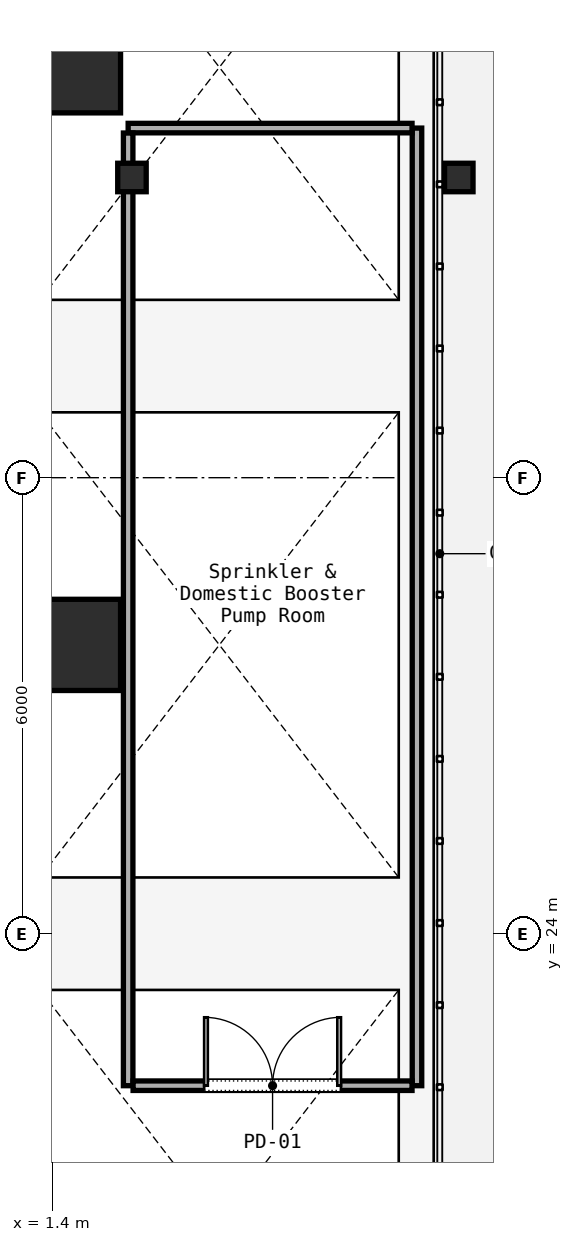
"""IFC4 building model, lengths in metres.
Left out: names, types, materials, properties, quantities, classifications, styles, units other than length and angle.
Written with IfcOpenShell. Run it as: python <this file> out.ifc"""

import sys

from ifc_helpers import new_model, si_unit, direction, frame, frame_2d, origin, origin_2d, place, context, subcontext, project, spatial, rectangle, i_section, extrude, element, fill, save


model = new_model("IFC4")
c1 = context("Model", 3, precision=1e-05, world=origin(), true_north=direction((0.0, 1.0)))
c2 = subcontext(c1, "Body", "Model", "MODEL_VIEW")
j1 = project(units=[si_unit("LENGTHUNIT", "METRE"), si_unit("PLANEANGLEUNIT", "RADIAN")], contexts=[c1])
p1 = place(None, origin())
s1 = spatial("IfcSite", under=j1, at=p1, CompositionType="ELEMENT")
p2 = place(p1, origin())
s2 = spatial("IfcBuilding", under=s1, at=p2, CompositionType="ELEMENT")
p3 = place(p2, frame((0.0, 0.0, -9.0)))
s3 = spatial("IfcBuildingStorey", under=s2, at=p3, CompositionType="ELEMENT", Elevation=-9.0)
for number, where, z_axis, x_axis in (
    (1, (1.7, 27.8, 0.0), (0.0, 0.0, 1.0), (1.0, 0.0, 0.0)),
    (2, (1.7, 35.4, 0.0), (0.0, 0.0, 1.0), (1.0, 0.0, 0.0)),
):
    element("IfcColumn", number, at=place(p3, frame(where, z_axis=z_axis, x_axis=x_axis)), inside=s3, PredefinedType="COLUMN", context=c2, shape_type="SweptSolid", body=[
        extrude(rectangle(XDim=1.2, YDim=1.2, at=origin_2d()), origin(), (0.0, 0.0, 1.0), 4.15),
    ])
for number, where, z_axis, x_axis in (
    (3, (2.45, 33.95, 0.0), (0.0, 0.0, 1.0), (1.0, 0.0, 0.0)),
    (4, (6.75, 33.95, 0.0), (0.0, 0.0, 1.0), (1.0, 0.0, 0.0)),
):
    element("IfcColumn", number, at=place(p3, frame(where, z_axis=z_axis, x_axis=x_axis)), inside=s3, PredefinedType="COLUMN", context=c2, shape_type="SweptSolid", body=[
        extrude(i_section(OverallWidth=0.375, OverallDepth=0.375, WebThickness=0.017, FlangeThickness=0.027, FilletRadius=0.015, at=origin_2d()), origin(), (0.0, 0.0, 1.0), 4.5),
    ])
p4 = place(p3, frame((6.2, 22.0, 0.0), z_axis=(0.0, 0.0, 1.0), x_axis=(0.0, 1.0, 0.0)))
e5 = element("IfcWall", 5, at=p4, inside=s3, PredefinedType="PARTITIONING", context=c2, shape_type="SweptSolid", body=[
    extrude(rectangle(XDim=12.6, YDim=0.125, at=frame_2d((6.3, 0.0))), origin(), (0.0, 0.0, 1.0), 3.193),
])
p5 = place(p3, frame((6.135, 34.6, 0.0), z_axis=(0.0, 0.0, 1.0), x_axis=(-1.0, 0.0, 0.0)))
e6 = element("IfcWall", 6, at=p5, inside=s3, PredefinedType="PARTITIONING", context=c2, shape_type="SweptSolid", body=[
    extrude(rectangle(XDim=3.735, YDim=0.125, at=frame_2d((1.868, 0.0))), origin(), (0.0, 0.0, 1.0), 3.193),
])
p6 = place(p3, frame((2.4, 34.535, 0.0), z_axis=(0.0, 0.0, 1.0), x_axis=(0.0, -1.0, 0.0)))
e7 = element("IfcWall", 7, at=p6, inside=s3, PredefinedType="PARTITIONING", context=c2, shape_type="SweptSolid", body=[
    extrude(rectangle(XDim=12.535, YDim=0.125, at=frame_2d((6.268, 0.0))), origin(), (0.0, 0.0, 1.0), 3.193),
])
p7 = place(p3, frame((2.465, 22.0, 0.0), z_axis=(0.0, 0.0, 1.0), x_axis=(1.0, 0.0, 0.0)))
e8 = element("IfcWall", 8, at=p7, inside=s3, PredefinedType="PARTITIONING", context=c2, shape_type="SweptSolid", body=[
    extrude(rectangle(XDim=3.67, YDim=0.125, at=frame_2d((1.835, 0.0))), origin(), (0.0, 0.0, 1.0), 3.193),
])
p8 = place(p7, frame((0.935, 0.0, 0.0)))
e9 = element("IfcOpeningElement", 9, at=p8, cuts=e8, PredefinedType="OPENING", context=c2, shape_type="SweptSolid", body=[
    extrude(rectangle(XDim=1.8, YDim=2.3, at=frame_2d((0.9, 1.15))), frame((0.0, 0.062, 0.0), z_axis=(0.0, -1.0, 0.0), x_axis=(1.0, 0.0, 0.0)), (0.0, 0.0, 1.0), 0.125),
])
p9 = place(p8, origin())
e10 = element("IfcDoor", 10, at=p9, inside=s3, OperationType="SINGLE_SWING_LEFT", PredefinedType="DOOR", context=c2, shape_type="SweptSolid", body=[
    extrude(rectangle(XDim=1.8, YDim=2.3, at=frame_2d((0.9, 1.15))), frame((0.0, 0.025, 0.0), z_axis=(0.0, -1.0, 0.0), x_axis=(1.0, 0.0, 0.0)), (0.0, 0.0, 1.0), 0.05),
])
fill(e9, e10)
save(model, sys.argv[1])
